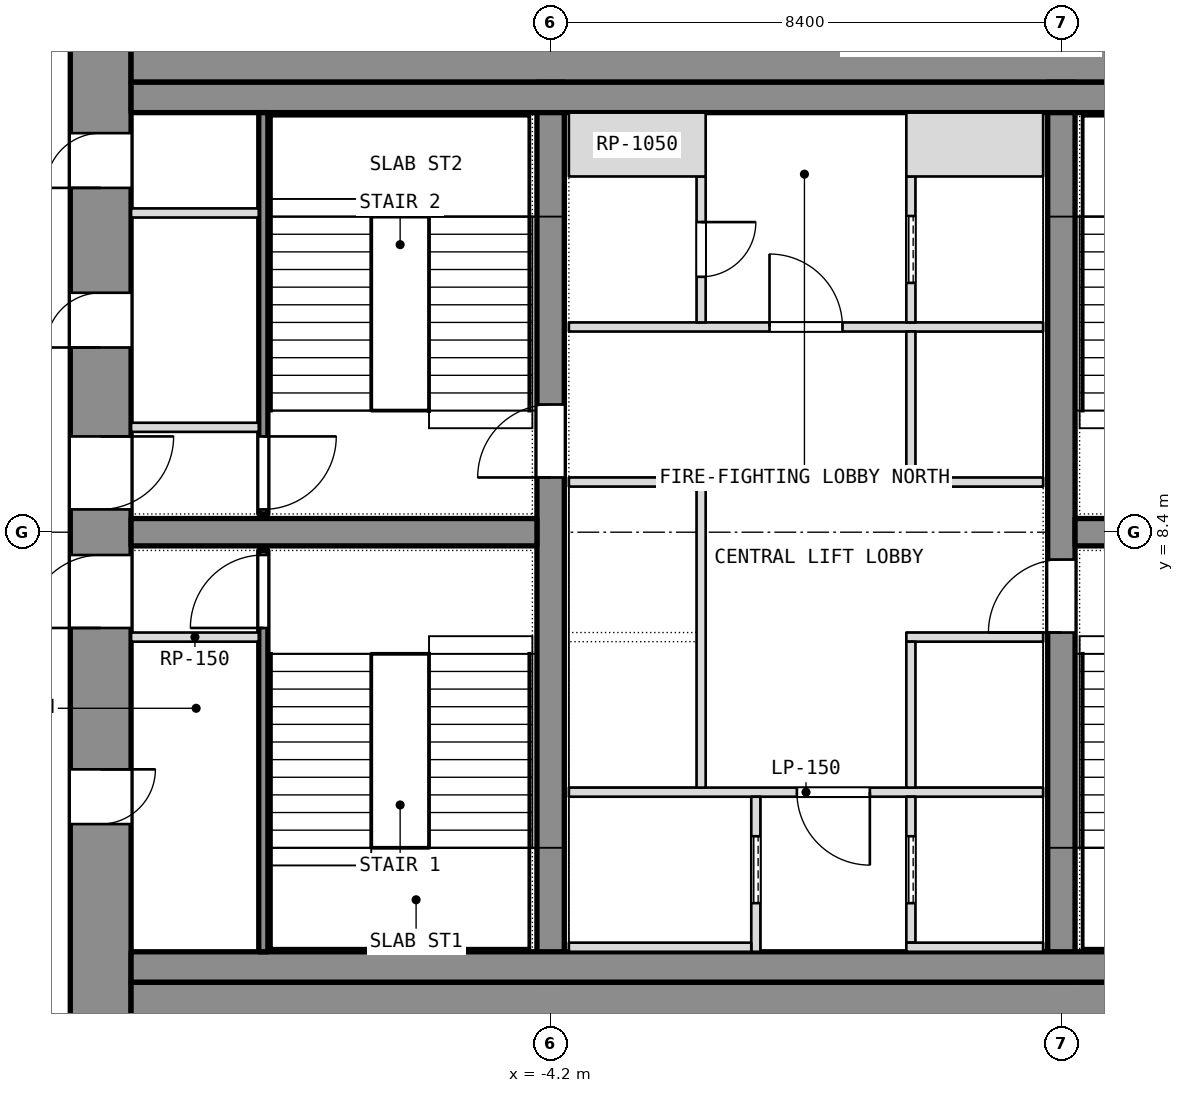
"""IFC4 building model, lengths in metres.
Left out: names, types, materials, properties, quantities, classifications, styles, units other than length and angle.
Written with IfcOpenShell. Run it as: python <this file> out.ifc"""

import sys

from ifc_helpers import new_model, si_unit, direction, frame, frame_2d, origin, place, context, subcontext, project, spatial, rectangle, extrude, element, fill, save


model = new_model("IFC4")
c1 = context("Model", 3, precision=1e-05, world=origin(), true_north=direction((0.0, 1.0)))
c2 = subcontext(c1, "Body", "Model", "MODEL_VIEW")
j1 = project(units=[si_unit("LENGTHUNIT", "METRE"), si_unit("PLANEANGLEUNIT", "RADIAN")], contexts=[c1])
p1 = place(None, origin())
s1 = spatial("IfcSite", under=j1, at=p1, CompositionType="ELEMENT")
p2 = place(p1, origin())
s2 = spatial("IfcBuilding", under=s1, at=p2, CompositionType="ELEMENT")
p3 = place(p2, frame((0.0, 0.0, 108.5)))
s3 = spatial("IfcBuildingStorey", under=s2, at=p3, CompositionType="ELEMENT", Elevation=108.5)
p4 = place(p3, frame((-11.6, 0.0, 0.0), z_axis=(0.0, 0.0, 1.0), x_axis=(0.0, 1.0, 0.0)))
e1 = element("IfcWall", 1, at=p4, inside=s3, PredefinedType="SHEAR", context=c2, shape_type="SweptSolid", body=[
    extrude(rectangle(XDim=16.8, YDim=1.0, at=frame_2d((8.4, 0.0))), origin(), (0.0, 0.0, 1.0), 3.6),
])
p5 = place(p4, frame((3.6, 0.0, 0.0)))
e2 = element("IfcOpeningElement", 2, at=p5, cuts=e1, PredefinedType="OPENING", context=c2, shape_type="SweptSolid", body=[
    extrude(rectangle(XDim=0.9, YDim=2.1, at=frame_2d((0.45, 1.05))), frame((0.0, 0.5, 0.0), z_axis=(0.0, -1.0, 0.0), x_axis=(1.0, 0.0, 0.0)), (0.0, 0.0, 1.0), 1.0),
])
p6 = place(p4, frame((6.825, 0.0, 0.0)))
e3 = element("IfcOpeningElement", 3, at=p6, cuts=e1, PredefinedType="OPENING", context=c2, shape_type="SweptSolid", body=[
    extrude(rectangle(XDim=1.2, YDim=2.1, at=frame_2d((0.6, 1.05))), frame((0.0, 0.5, 0.0), z_axis=(0.0, -1.0, 0.0), x_axis=(1.0, 0.0, 0.0)), (0.0, 0.0, 1.0), 1.0),
])
p7 = place(p4, frame((14.062, 0.0, 0.0)))
e4 = element("IfcOpeningElement", 4, at=p7, cuts=e1, PredefinedType="OPENING", context=c2, shape_type="SweptSolid", body=[
    extrude(rectangle(XDim=0.9, YDim=2.1, at=frame_2d((0.45, 1.05))), frame((0.0, 0.5, 0.0), z_axis=(0.0, -1.0, 0.0), x_axis=(1.0, 0.0, 0.0)), (0.0, 0.0, 1.0), 1.0),
])
p8 = place(p4, frame((11.438, 0.0, 0.0)))
e5 = element("IfcOpeningElement", 5, at=p8, cuts=e1, PredefinedType="OPENING", context=c2, shape_type="SweptSolid", body=[
    extrude(rectangle(XDim=0.9, YDim=2.1, at=frame_2d((0.45, 1.05))), frame((0.0, 0.5, 0.0), z_axis=(0.0, -1.0, 0.0), x_axis=(1.0, 0.0, 0.0)), (0.0, 0.0, 1.0), 1.0),
])
p9 = place(p4, frame((8.775, 0.0, 0.0)))
e6 = element("IfcOpeningElement", 6, at=p9, cuts=e1, PredefinedType="OPENING", context=c2, shape_type="SweptSolid", body=[
    extrude(rectangle(XDim=1.2, YDim=2.1, at=frame_2d((0.6, 1.05))), frame((0.0, 0.5, 0.0), z_axis=(0.0, -1.0, 0.0), x_axis=(1.0, 0.0, 0.0)), (0.0, 0.0, 1.0), 1.0),
])
for number, where, z_axis, x_axis in (
    (7, (-11.1, 0.5, 0.0), (0.0, 0.0, 1.0), (1.0, 0.0, 0.0)),
    (8, (-11.1, 16.3, 0.0), (0.0, 0.0, 1.0), (1.0, 0.0, 0.0)),
):
    element("IfcWall", number, at=place(p3, frame(where, z_axis=z_axis, x_axis=x_axis)), inside=s3, PredefinedType="SHEAR", context=c2, shape_type="SweptSolid", body=[
        extrude(rectangle(XDim=22.2, YDim=1.0, at=frame_2d((11.1, 0.0))), origin(), (0.0, 0.0, 1.0), 3.6),
    ])
p10 = place(p3, frame((-4.2, 1.0, 0.0), z_axis=(0.0, 0.0, 1.0), x_axis=(0.0, 1.0, 0.0)))
e9 = element("IfcWall", 9, at=p10, inside=s3, PredefinedType="SHEAR", context=c2, shape_type="SweptSolid", body=[
    extrude(rectangle(XDim=14.8, YDim=0.45, at=frame_2d((7.4, 0.0))), origin(), (0.0, 0.0, 1.0), 3.6),
])
p11 = place(p10, frame((8.3, 0.0, 0.0)))
e10 = element("IfcOpeningElement", 10, at=p11, cuts=e9, PredefinedType="OPENING", context=c2, shape_type="SweptSolid", body=[
    extrude(rectangle(XDim=1.2, YDim=2.1, at=frame_2d((0.6, 1.05))), frame((0.0, 0.225, 0.0), z_axis=(0.0, -1.0, 0.0), x_axis=(1.0, 0.0, 0.0)), (0.0, 0.0, 1.0), 0.45),
])
p12 = place(p3, frame((4.2, 1.0, 0.0), z_axis=(0.0, 0.0, 1.0), x_axis=(0.0, 1.0, 0.0)))
e11 = element("IfcWall", 11, at=p12, inside=s3, PredefinedType="SHEAR", context=c2, shape_type="SweptSolid", body=[
    extrude(rectangle(XDim=14.8, YDim=0.45, at=frame_2d((7.4, 0.0))), origin(), (0.0, 0.0, 1.0), 3.6),
])
p13 = place(p12, frame((5.75, 0.0, 0.0)))
e12 = element("IfcOpeningElement", 12, at=p13, cuts=e11, PredefinedType="OPENING", context=c2, shape_type="SweptSolid", body=[
    extrude(rectangle(XDim=1.2, YDim=2.1, at=frame_2d((0.6, 1.05))), frame((0.0, 0.225, 0.0), z_axis=(0.0, -1.0, 0.0), x_axis=(1.0, 0.0, 0.0)), (0.0, 0.0, 1.0), 0.45),
])
for number, where, z_axis, x_axis in (
    (13, (-11.1, 8.4, 0.0), (0.0, 0.0, 1.0), (1.0, 0.0, 0.0)),
    (14, (4.425, 8.4, 0.0), (0.0, 0.0, 1.0), (1.0, 0.0, 0.0)),
):
    element("IfcWall", number, at=place(p3, frame(where, z_axis=z_axis, x_axis=x_axis)), inside=s3, PredefinedType="SHEAR", context=c2, shape_type="SweptSolid", body=[
        extrude(rectangle(XDim=6.675, YDim=0.45, at=frame_2d((3.337, 0.0))), origin(), (0.0, 0.0, 1.0), 3.6),
    ])
for number, where, z_axis, x_axis in (
    (15, (-11.1, 1.25, 0.0), (0.0, 0.0, 1.0), (1.0, 0.0, 0.0)),
    (16, (-11.1, 15.55, 0.0), (0.0, 0.0, 1.0), (1.0, 0.0, 0.0)),
):
    element("IfcWall", number, at=place(p3, frame(where, z_axis=z_axis, x_axis=x_axis)), inside=s3, PredefinedType="PARTITIONING", context=c2, shape_type="SweptSolid", body=[
        extrude(rectangle(XDim=22.2, YDim=0.5, at=frame_2d((11.1, 0.0))), origin(), (0.0, 0.0, 1.0), 3.34),
    ])
p14 = place(p3, frame((-8.925, 1.5, 0.0), z_axis=(0.0, 0.0, 1.0), x_axis=(0.0, 1.0, 0.0)))
e17 = element("IfcWall", 17, at=p14, inside=s3, PredefinedType="SHEAR", context=c2, shape_type="SweptSolid", body=[
    extrude(rectangle(XDim=6.6, YDim=0.15, at=frame_2d((3.3, 0.0))), origin(), (0.0, 0.0, 1.0), 3.34),
])
p15 = place(p14, frame((5.325, 0.0, 0.0)))
e18 = element("IfcOpeningElement", 18, at=p15, cuts=e17, PredefinedType="OPENING", context=c2, shape_type="SweptSolid", body=[
    extrude(rectangle(XDim=1.2, YDim=2.1, at=frame_2d((0.6, 1.05))), frame((0.0, 0.075, 0.0), z_axis=(0.0, -1.0, 0.0), x_axis=(1.0, 0.0, 0.0)), (0.0, 0.0, 1.0), 0.15),
])
p16 = place(p3, frame((-11.1, 6.675, 0.0), z_axis=(0.0, 0.0, 1.0), x_axis=(1.0, 0.0, 0.0)))
e19 = element("IfcWall", 19, at=p16, inside=s3, PredefinedType="PARTITIONING", context=c2, shape_type="SweptSolid", body=[
    extrude(rectangle(XDim=2.1, YDim=0.15, at=frame_2d((1.05, 0.0))), origin(), (0.0, 0.0, 1.0), 3.34),
])
p17 = place(p3, frame((-8.925, 8.7, 0.0), z_axis=(0.0, 0.0, 1.0), x_axis=(0.0, 1.0, 0.0)))
e20 = element("IfcWall", 20, at=p17, inside=s3, PredefinedType="SHEAR", context=c2, shape_type="SweptSolid", body=[
    extrude(rectangle(XDim=6.6, YDim=0.15, at=frame_2d((3.3, 0.0))), origin(), (0.0, 0.0, 1.0), 3.34),
])
p18 = place(p17, frame((0.075, 0.0, 0.0)))
e21 = element("IfcOpeningElement", 21, at=p18, cuts=e20, PredefinedType="OPENING", context=c2, shape_type="SweptSolid", body=[
    extrude(rectangle(XDim=1.2, YDim=2.1, at=frame_2d((0.6, 1.05))), frame((0.0, 0.075, 0.0), z_axis=(0.0, -1.0, 0.0), x_axis=(1.0, 0.0, 0.0)), (0.0, 0.0, 1.0), 0.15),
])
for number, where, z_axis, x_axis in (
    (22, (-11.1, 10.125, 0.0), (0.0, 0.0, 1.0), (1.0, 0.0, 0.0)),
    (23, (-11.1, 13.65, 0.0), (0.0, 0.0, 1.0), (1.0, 0.0, 0.0)),
):
    element("IfcWall", number, at=place(p3, frame(where, z_axis=z_axis, x_axis=x_axis)), inside=s3, PredefinedType="PARTITIONING", context=c2, shape_type="SweptSolid", body=[
        extrude(rectangle(XDim=2.1, YDim=0.15, at=frame_2d((1.05, 0.0))), origin(), (0.0, 0.0, 1.0), 3.34),
    ])
p19 = place(p3, frame((-3.9, 4.125, 0.0), z_axis=(0.0, 0.0, 1.0), x_axis=(1.0, 0.0, 0.0)))
e24 = element("IfcWall", 24, at=p19, inside=s3, PredefinedType="PARTITIONING", context=c2, shape_type="SweptSolid", body=[
    extrude(rectangle(XDim=7.8, YDim=0.15, at=frame_2d((3.9, 0.0))), origin(), (0.0, 0.0, 1.0), 3.34),
])
p20 = place(p19, frame((3.75, 0.0, 0.0)))
e25 = element("IfcOpeningElement", 25, at=p20, cuts=e24, PredefinedType="OPENING", context=c2, shape_type="SweptSolid", body=[
    extrude(rectangle(XDim=1.2, YDim=2.1, at=frame_2d((0.6, 1.05))), frame((0.0, 0.075, 0.0), z_axis=(0.0, -1.0, 0.0), x_axis=(1.0, 0.0, 0.0)), (0.0, 0.0, 1.0), 0.15),
])
p21 = place(p3, frame((-3.9, 11.775, 0.0), z_axis=(0.0, 0.0, 1.0), x_axis=(1.0, 0.0, 0.0)))
e26 = element("IfcWall", 26, at=p21, inside=s3, PredefinedType="PARTITIONING", context=c2, shape_type="SweptSolid", body=[
    extrude(rectangle(XDim=7.8, YDim=0.15, at=frame_2d((3.9, 0.0))), origin(), (0.0, 0.0, 1.0), 3.34),
])
p22 = place(p21, frame((3.3, 0.0, 0.0)))
e27 = element("IfcOpeningElement", 27, at=p22, cuts=e26, PredefinedType="OPENING", context=c2, shape_type="SweptSolid", body=[
    extrude(rectangle(XDim=1.2, YDim=2.1, at=frame_2d((0.6, 1.05))), frame((0.0, 0.075, 0.0), z_axis=(0.0, -1.0, 0.0), x_axis=(1.0, 0.0, 0.0)), (0.0, 0.0, 1.0), 0.15),
])
p23 = place(p3, frame((-0.825, 1.5, 0.0), z_axis=(0.0, 0.0, 1.0), x_axis=(0.0, 1.0, 0.0)))
e28 = element("IfcWall", 28, at=p23, inside=s3, PredefinedType="SHEAR", context=c2, shape_type="SweptSolid", body=[
    extrude(rectangle(XDim=2.55, YDim=0.15, at=frame_2d((1.275, 0.0))), origin(), (0.0, 0.0, 1.0), 3.6),
])
p24 = place(p23, frame((0.8, 0.0, 0.0)))
e29 = element("IfcOpeningElement", 29, at=p24, cuts=e28, PredefinedType="OPENING", context=c2, shape_type="SweptSolid", body=[
    extrude(rectangle(XDim=1.1, YDim=2.1, at=frame_2d((0.55, 1.05))), frame((0.0, 0.075, 0.0), z_axis=(0.0, -1.0, 0.0), x_axis=(1.0, 0.0, 0.0)), (0.0, 0.0, 1.0), 0.15),
])
p25 = place(p3, frame((-3.9, 1.575, 0.0), z_axis=(0.0, 0.0, 1.0), x_axis=(1.0, 0.0, 0.0)))
e30 = element("IfcWall", 30, at=p25, inside=s3, PredefinedType="SHEAR", context=c2, shape_type="SweptSolid", body=[
    extrude(rectangle(XDim=3.0, YDim=0.15, at=frame_2d((1.5, 0.0))), origin(), (0.0, 0.0, 1.0), 3.6),
])
p26 = place(p3, frame((-1.725, 4.2, 0.0), z_axis=(0.0, 0.0, 1.0), x_axis=(0.0, 1.0, 0.0)))
e31 = element("IfcWall", 31, at=p26, inside=s3, PredefinedType="SHEAR", context=c2, shape_type="SweptSolid", body=[
    extrude(rectangle(XDim=4.95, YDim=0.15, at=frame_2d((2.475, 0.0))), origin(), (0.0, 0.0, 1.0), 3.6),
])
p27 = place(p3, frame((-3.9, 9.225, 0.0), z_axis=(0.0, 0.0, 1.0), x_axis=(1.0, 0.0, 0.0)))
e32 = element("IfcWall", 32, at=p27, inside=s3, PredefinedType="SHEAR", context=c2, shape_type="SweptSolid", body=[
    extrude(rectangle(XDim=2.25, YDim=0.15, at=frame_2d((1.125, 0.0))), origin(), (0.0, 0.0, 1.0), 3.6),
])
p28 = place(p3, frame((-1.725, 11.85, 0.0), z_axis=(0.0, 0.0, 1.0), x_axis=(0.0, 1.0, 0.0)))
e33 = element("IfcWall", 33, at=p28, inside=s3, PredefinedType="PARTITIONING", context=c2, shape_type="SweptSolid", body=[
    extrude(rectangle(XDim=2.4, YDim=0.15, at=frame_2d((1.2, 0.0))), origin(), (0.0, 0.0, 1.0), 3.34),
])
p29 = place(p28, frame((0.75, 0.0, 0.0)))
e34 = element("IfcOpeningElement", 34, at=p29, cuts=e33, PredefinedType="OPENING", context=c2, shape_type="SweptSolid", body=[
    extrude(rectangle(XDim=0.9, YDim=2.1, at=frame_2d((0.45, 1.05))), frame((0.0, 0.075, 0.0), z_axis=(0.0, -1.0, 0.0), x_axis=(1.0, 0.0, 0.0)), (0.0, 0.0, 1.0), 0.15),
])
p30 = place(p3, frame((-3.9, 14.775, 0.0), z_axis=(0.0, 0.0, 1.0), x_axis=(1.0, 0.0, 0.0)))
e35 = element("IfcWall", 35, at=p30, inside=s3, PredefinedType="PARTITIONING", context=c2, shape_type="SweptSolid", body=[
    extrude(rectangle(XDim=2.25, YDim=1.05, at=frame_2d((1.125, 0.0))), origin(), (0.0, 0.0, 1.0), 3.34),
])
p31 = place(p3, frame((1.725, 1.65, 0.0), z_axis=(0.0, 0.0, 1.0), x_axis=(0.0, 1.0, 0.0)))
e36 = element("IfcWall", 36, at=p31, inside=s3, PredefinedType="SHEAR", context=c2, shape_type="SweptSolid", body=[
    extrude(rectangle(XDim=2.4, YDim=0.15, at=frame_2d((1.2, 0.0))), origin(), (0.0, 0.0, 1.0), 3.6),
])
p32 = place(p31, frame((0.65, 0.0, 0.0)))
e37 = element("IfcOpeningElement", 37, at=p32, cuts=e36, PredefinedType="OPENING", context=c2, shape_type="SweptSolid", body=[
    extrude(rectangle(XDim=1.1, YDim=2.1, at=frame_2d((0.55, 1.05))), frame((0.0, 0.075, 0.0), z_axis=(0.0, -1.0, 0.0), x_axis=(1.0, 0.0, 0.0)), (0.0, 0.0, 1.0), 0.15),
])
p33 = place(p3, frame((1.65, 1.575, 0.0), z_axis=(0.0, 0.0, 1.0), x_axis=(1.0, 0.0, 0.0)))
e38 = element("IfcWall", 38, at=p33, inside=s3, PredefinedType="SHEAR", context=c2, shape_type="SweptSolid", body=[
    extrude(rectangle(XDim=2.25, YDim=0.15, at=frame_2d((1.125, 0.0))), origin(), (0.0, 0.0, 1.0), 3.6),
])
p34 = place(p3, frame((1.725, 11.85, 0.0), z_axis=(0.0, 0.0, 1.0), x_axis=(0.0, 1.0, 0.0)))
e39 = element("IfcWall", 39, at=p34, inside=s3, PredefinedType="SHEAR", context=c2, shape_type="SweptSolid", body=[
    extrude(rectangle(XDim=2.4, YDim=0.15, at=frame_2d((1.2, 0.0))), origin(), (0.0, 0.0, 1.0), 3.6),
])
p35 = place(p34, frame((0.65, 0.0, 0.0)))
e40 = element("IfcOpeningElement", 40, at=p35, cuts=e39, PredefinedType="OPENING", context=c2, shape_type="SweptSolid", body=[
    extrude(rectangle(XDim=1.1, YDim=2.1, at=frame_2d((0.55, 1.05))), frame((0.0, 0.075, 0.0), z_axis=(0.0, -1.0, 0.0), x_axis=(1.0, 0.0, 0.0)), (0.0, 0.0, 1.0), 0.15),
])
p36 = place(p3, frame((1.65, 14.775, 0.0), z_axis=(0.0, 0.0, 1.0), x_axis=(1.0, 0.0, 0.0)))
e41 = element("IfcWall", 41, at=p36, inside=s3, PredefinedType="SHEAR", context=c2, shape_type="SweptSolid", body=[
    extrude(rectangle(XDim=2.25, YDim=1.05, at=frame_2d((1.125, 0.0))), origin(), (0.0, 0.0, 1.0), 3.6),
])
for number, where, z_axis, x_axis in (
    (42, (1.65, 6.675, 0.0), (0.0, 0.0, 1.0), (1.0, 0.0, 0.0)),
    (43, (1.65, 9.225, 0.0), (0.0, 0.0, 1.0), (1.0, 0.0, 0.0)),
):
    element("IfcWall", number, at=place(p3, frame(where, z_axis=z_axis, x_axis=x_axis)), inside=s3, PredefinedType="SHEAR", context=c2, shape_type="SweptSolid", body=[
        extrude(rectangle(XDim=2.25, YDim=0.15, at=frame_2d((1.125, 0.0))), origin(), (0.0, 0.0, 1.0), 3.6),
    ])
p37 = place(p3, frame((1.725, 4.2, 0.0), z_axis=(0.0, 0.0, 1.0), x_axis=(0.0, 1.0, 0.0)))
e44 = element("IfcWall", 44, at=p37, inside=s3, PredefinedType="SHEAR", context=c2, shape_type="SweptSolid", body=[
    extrude(rectangle(XDim=2.4, YDim=0.15, at=frame_2d((1.2, 0.0))), origin(), (0.0, 0.0, 1.0), 3.6),
])
p38 = place(p3, frame((1.725, 9.3, 0.0), z_axis=(0.0, 0.0, 1.0), x_axis=(0.0, 1.0, 0.0)))
e45 = element("IfcWall", 45, at=p38, inside=s3, PredefinedType="SHEAR", context=c2, shape_type="SweptSolid", body=[
    extrude(rectangle(XDim=2.4, YDim=0.15, at=frame_2d((1.2, 0.0))), origin(), (0.0, 0.0, 1.0), 3.6),
])
p39 = place(p5, origin())
e46 = element("IfcDoor", 46, at=p39, inside=s3, OperationType="SINGLE_SWING_LEFT", PredefinedType="DOOR", context=c2, shape_type="SweptSolid", body=[
    extrude(rectangle(XDim=0.9, YDim=2.1, at=frame_2d((0.45, 1.05))), frame((0.0, 0.025, 0.0), z_axis=(0.0, -1.0, 0.0), x_axis=(1.0, 0.0, 0.0)), (0.0, 0.0, 1.0), 0.05),
])
fill(e2, e46)
p40 = place(p6, origin())
e47 = element("IfcDoor", 47, at=p40, inside=s3, OperationType="SINGLE_SWING_LEFT", PredefinedType="DOOR", context=c2, shape_type="SweptSolid", body=[
    extrude(rectangle(XDim=1.2, YDim=2.1, at=frame_2d((0.6, 1.05))), frame((0.0, 0.025, 0.0), z_axis=(0.0, -1.0, 0.0), x_axis=(1.0, 0.0, 0.0)), (0.0, 0.0, 1.0), 0.05),
])
fill(e3, e47)
p41 = place(p15, origin())
e48 = element("IfcDoor", 48, at=p41, inside=s3, OperationType="SINGLE_SWING_LEFT", PredefinedType="DOOR", context=c2, shape_type="SweptSolid", body=[
    extrude(rectangle(XDim=1.2, YDim=2.1, at=frame_2d((0.6, 1.05))), frame((0.0, 0.025, 0.0), z_axis=(0.0, -1.0, 0.0), x_axis=(1.0, 0.0, 0.0)), (0.0, 0.0, 1.0), 0.05),
])
fill(e18, e48)
p42 = place(p7, origin())
e49 = element("IfcDoor", 49, at=p42, inside=s3, OperationType="SINGLE_SWING_LEFT", PredefinedType="DOOR", context=c2, shape_type="SweptSolid", body=[
    extrude(rectangle(XDim=0.9, YDim=2.1, at=frame_2d((0.45, 1.05))), frame((0.0, 0.025, 0.0), z_axis=(0.0, -1.0, 0.0), x_axis=(1.0, 0.0, 0.0)), (0.0, 0.0, 1.0), 0.05),
])
fill(e4, e49)
p43 = place(p8, origin())
e50 = element("IfcDoor", 50, at=p43, inside=s3, OperationType="SINGLE_SWING_LEFT", PredefinedType="DOOR", context=c2, shape_type="SweptSolid", body=[
    extrude(rectangle(XDim=0.9, YDim=2.1, at=frame_2d((0.45, 1.05))), frame((0.0, 0.025, 0.0), z_axis=(0.0, -1.0, 0.0), x_axis=(1.0, 0.0, 0.0)), (0.0, 0.0, 1.0), 0.05),
])
fill(e5, e50)
p44 = place(p9, origin())
e51 = element("IfcDoor", 51, at=p44, inside=s3, OperationType="SINGLE_SWING_LEFT", PredefinedType="DOOR", context=c2, shape_type="SweptSolid", body=[
    extrude(rectangle(XDim=1.2, YDim=2.1, at=frame_2d((0.6, 1.05))), frame((0.0, 0.025, 0.0), z_axis=(0.0, -1.0, 0.0), x_axis=(1.0, 0.0, 0.0)), (0.0, 0.0, 1.0), 0.05),
])
fill(e6, e51)
p45 = place(p18, origin())
e52 = element("IfcDoor", 52, at=p45, inside=s3, OperationType="SINGLE_SWING_LEFT", PredefinedType="DOOR", context=c2, shape_type="SweptSolid", body=[
    extrude(rectangle(XDim=1.2, YDim=2.1, at=frame_2d((0.6, 1.05))), frame((0.0, 0.025, 0.0), z_axis=(0.0, -1.0, 0.0), x_axis=(1.0, 0.0, 0.0)), (0.0, 0.0, 1.0), 0.05),
])
fill(e21, e52)
p46 = place(p24, origin())
e53 = element("IfcDoor", 53, at=p46, inside=s3, OperationType="SLIDING_TO_LEFT", PredefinedType="DOOR", context=c2, shape_type="SweptSolid", body=[
    extrude(rectangle(XDim=1.1, YDim=2.1, at=frame_2d((0.55, 1.05))), frame((0.0, 0.025, 0.0), z_axis=(0.0, -1.0, 0.0), x_axis=(1.0, 0.0, 0.0)), (0.0, 0.0, 1.0), 0.05),
])
fill(e29, e53)
p47 = place(p32, origin())
e54 = element("IfcDoor", 54, at=p47, inside=s3, OperationType="SLIDING_TO_LEFT", PredefinedType="DOOR", context=c2, shape_type="SweptSolid", body=[
    extrude(rectangle(XDim=1.1, YDim=2.1, at=frame_2d((0.55, 1.05))), frame((0.0, 0.025, 0.0), z_axis=(0.0, -1.0, 0.0), x_axis=(1.0, 0.0, 0.0)), (0.0, 0.0, 1.0), 0.05),
])
fill(e37, e54)
p48 = place(p35, origin())
e55 = element("IfcDoor", 55, at=p48, inside=s3, OperationType="SLIDING_TO_LEFT", PredefinedType="DOOR", context=c2, shape_type="SweptSolid", body=[
    extrude(rectangle(XDim=1.1, YDim=2.1, at=frame_2d((0.55, 1.05))), frame((0.0, 0.025, 0.0), z_axis=(0.0, -1.0, 0.0), x_axis=(1.0, 0.0, 0.0)), (0.0, 0.0, 1.0), 0.05),
])
fill(e40, e55)
p49 = place(p20, origin())
e56 = element("IfcDoor", 56, at=p49, inside=s3, OperationType="SINGLE_SWING_LEFT", PredefinedType="DOOR", context=c2, shape_type="SweptSolid", body=[
    extrude(rectangle(XDim=1.2, YDim=2.1, at=frame_2d((0.6, 1.05))), frame((0.0, 0.025, 0.0), z_axis=(0.0, -1.0, 0.0), x_axis=(1.0, 0.0, 0.0)), (0.0, 0.0, 1.0), 0.05),
])
fill(e25, e56)
p50 = place(p22, origin())
e57 = element("IfcDoor", 57, at=p50, inside=s3, OperationType="SINGLE_SWING_LEFT", PredefinedType="DOOR", context=c2, shape_type="SweptSolid", body=[
    extrude(rectangle(XDim=1.2, YDim=2.1, at=frame_2d((0.6, 1.05))), frame((0.0, 0.025, 0.0), z_axis=(0.0, -1.0, 0.0), x_axis=(1.0, 0.0, 0.0)), (0.0, 0.0, 1.0), 0.05),
])
fill(e27, e57)
p51 = place(p29, origin())
e58 = element("IfcDoor", 58, at=p51, inside=s3, OperationType="SINGLE_SWING_LEFT", PredefinedType="DOOR", context=c2, shape_type="SweptSolid", body=[
    extrude(rectangle(XDim=0.9, YDim=2.1, at=frame_2d((0.45, 1.05))), frame((0.0, 0.025, 0.0), z_axis=(0.0, -1.0, 0.0), x_axis=(1.0, 0.0, 0.0)), (0.0, 0.0, 1.0), 0.05),
])
fill(e34, e58)
p52 = place(p11, origin())
e59 = element("IfcDoor", 59, at=p52, inside=s3, OperationType="SINGLE_SWING_LEFT", PredefinedType="DOOR", context=c2, shape_type="SweptSolid", body=[
    extrude(rectangle(XDim=1.2, YDim=2.1, at=frame_2d((0.6, 1.05))), frame((0.0, 0.025, 0.0), z_axis=(0.0, -1.0, 0.0), x_axis=(1.0, 0.0, 0.0)), (0.0, 0.0, 1.0), 0.05),
])
fill(e10, e59)
p53 = place(p13, origin())
e60 = element("IfcDoor", 60, at=p53, inside=s3, OperationType="SINGLE_SWING_LEFT", PredefinedType="DOOR", context=c2, shape_type="SweptSolid", body=[
    extrude(rectangle(XDim=1.2, YDim=2.1, at=frame_2d((0.6, 1.05))), frame((0.0, 0.025, 0.0), z_axis=(0.0, -1.0, 0.0), x_axis=(1.0, 0.0, 0.0)), (0.0, 0.0, 1.0), 0.05),
])
fill(e12, e60)
save(model, sys.argv[1])
